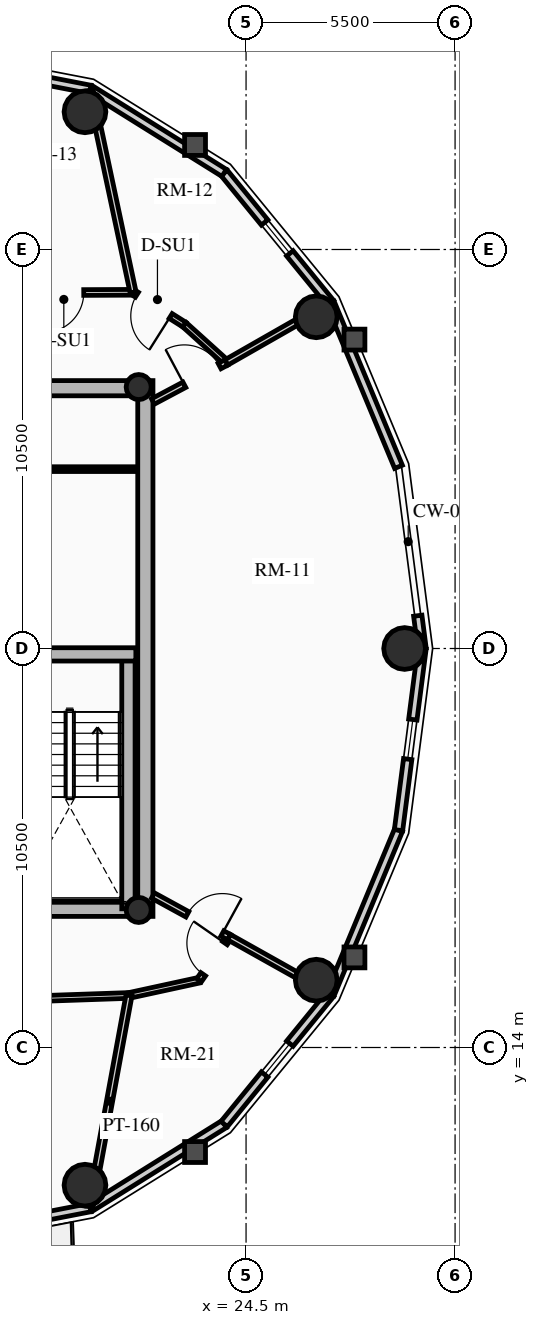
"""IFC4 building model, lengths in metres.
Left out: names, types, materials, properties, quantities, classifications, styles, units other than length and angle.
Written with IfcOpenShell. Run it as: python <this file> out.ifc"""

import sys

from ifc_helpers import new_model, si_unit, direction, frame, frame_2d, origin, origin_2d, place, context, subcontext, project, spatial, rectangle, circle, hollow_circle, extrude, source, transform, mapped, element, fill, save


model = new_model("IFC4")
c1 = context("Model", 3, precision=1e-05, world=origin(), true_north=direction((0.0, 1.0)))
c2 = subcontext(c1, "Body", "Model", "MODEL_VIEW")
j1 = project(units=[si_unit("LENGTHUNIT", "METRE"), si_unit("PLANEANGLEUNIT", "RADIAN")], contexts=[c1])
p1 = place(None, origin())
s1 = spatial("IfcSite", under=j1, at=p1, CompositionType="ELEMENT")
p2 = place(p1, origin())
s2 = spatial("IfcBuilding", under=s1, at=p2, CompositionType="ELEMENT")
p3 = place(p2, frame((0.0, 0.0, 205.39)))
s3 = spatial("IfcBuildingStorey", under=s2, at=p3, CompositionType="ELEMENT", Elevation=205.39)
p4 = place(p3, frame((21.85, 17.45, 0.0), z_axis=(0.0, 0.0, 1.0), x_axis=(0.0, 1.0, 0.0)))
e1 = element("IfcWall", 1, at=p4, inside=s3, PredefinedType="SHEAR", context=c2, shape_type="SweptSolid", body=[
    extrude(rectangle(XDim=14.1, YDim=0.4, at=frame_2d((7.05, 0.0))), origin(), (0.0, 0.0, 1.0), 2.91),
])
p5 = place(p3, frame((11.15, 17.65, 0.0), z_axis=(0.0, 0.0, 1.0), x_axis=(1.0, 0.0, 0.0)))
e2 = element("IfcWall", 2, at=p5, inside=s3, PredefinedType="SHEAR", context=c2, shape_type="SweptSolid", body=[
    extrude(rectangle(XDim=10.7, YDim=0.4, at=frame_2d((5.35, 0.0))), origin(), (0.0, 0.0, 1.0), 2.91),
])
m1 = source(origin(), c2, "Body", "SweptSolid", [
    extrude(rectangle(XDim=1.5, YDim=2.02, at=frame_2d((0.75, 1.01))), frame((0.0, 0.21, 0.0), z_axis=(0.0, -1.0, 0.0), x_axis=(1.0, 0.0, 0.0)), (0.0, 0.0, 1.0), 0.42),
])
p6 = place(p5, frame((5.45, 0.0, 0.0)))
e3 = element("IfcOpeningElement", 3, at=p6, cuts=e2, PredefinedType="OPENING", context=c2, shape_type="MappedRepresentation", body=[
    mapped(m1, transform((0.0, 0.0, 0.0), x_axis=(1.0, 0.0, 0.0), y_axis=(0.0, 1.0, 0.0), z_axis=(0.0, 0.0, 1.0), scale=1.0)),
])
p7 = place(p3, frame((11.15, 31.35, 0.0), z_axis=(0.0, 0.0, 1.0), x_axis=(1.0, 0.0, 0.0)))
e4 = element("IfcWall", 4, at=p7, inside=s3, PredefinedType="SHEAR", context=c2, shape_type="SweptSolid", body=[
    extrude(rectangle(XDim=10.7, YDim=0.4, at=frame_2d((5.35, 0.0))), origin(), (0.0, 0.0, 1.0), 2.91),
])
p8 = place(p7, frame((4.6, 0.0, 0.0)))
e5 = element("IfcOpeningElement", 5, at=p8, cuts=e4, PredefinedType="OPENING", context=c2, shape_type="MappedRepresentation", body=[
    mapped(m1, transform((0.0, 0.0, 0.0), x_axis=(1.0, 0.0, 0.0), y_axis=(0.0, 1.0, 0.0), z_axis=(0.0, 0.0, 1.0), scale=1.0)),
])
p9 = place(p3, frame((21.405, 17.65, 0.0), z_axis=(0.0, 0.0, 1.0), x_axis=(0.0, 1.0, 0.0)))
e6 = element("IfcWall", 6, at=p9, inside=s3, PredefinedType="SHEAR", context=c2, shape_type="SweptSolid", body=[
    extrude(rectangle(XDim=6.695, YDim=0.35, at=frame_2d((3.348, 0.0))), origin(), (0.0, 0.0, 1.0), 2.91),
])
p10 = place(p3, frame((18.315, 24.345, 0.0), z_axis=(0.0, 0.0, 1.0), x_axis=(1.0, 0.0, 0.0)))
e7 = element("IfcWall", 7, at=p10, inside=s3, PredefinedType="SHEAR", context=c2, shape_type="SweptSolid", body=[
    extrude(rectangle(XDim=3.285, YDim=0.35, at=frame_2d((1.643, 0.0))), origin(), (0.0, 0.0, 1.0), 2.91),
])
for number, where, z_axis, x_axis in (
    (8, (21.675, 17.62, 0.0), (0.0, 0.0, 1.0), (1.0, 0.0, 0.0)),
    (9, (21.675, 31.38, 0.0), (0.0, 0.0, 1.0), (1.0, 0.0, 0.0)),
):
    element("IfcColumn", number, at=place(p3, frame(where, z_axis=z_axis, x_axis=x_axis)), inside=s3, PredefinedType="COLUMN", context=c2, shape_type="SweptSolid", body=[
        extrude(hollow_circle(Radius=0.33, WallThickness=0.025, at=origin_2d()), origin(), (0.0, 0.0, 1.0), 2.91),
    ])
for number, where, z_axis, x_axis in (
    (10, (28.672, 24.5, 0.0), (0.0, 0.0, 1.0), (1.0, 0.0, 0.0)),
    (11, (26.347, 33.229, 0.0), (0.0, 0.0, 1.0), (1.0, 0.0, 0.0)),
    (12, (20.261, 38.623, 0.0), (0.0, 0.0, 1.0), (1.0, 0.0, 0.0)),
    (13, (20.261, 10.377, 0.0), (0.0, 0.0, 1.0), (1.0, 0.0, 0.0)),
    (14, (26.347, 15.771, 0.0), (0.0, 0.0, 1.0), (1.0, 0.0, 0.0)),
):
    element("IfcColumn", number, at=place(p3, frame(where, z_axis=z_axis, x_axis=x_axis)), inside=s3, PredefinedType="USERDEFINED", context=c2, shape_type="SweptSolid", body=[
        extrude(circle(Radius=0.55, at=origin_2d()), origin(), (0.0, 0.0, 1.0), 2.91),
    ])
p11 = place(p3, frame((29.018, 25.363, 0.0), z_axis=(0.0, 0.0, 1.0), x_axis=(0.128247365719, -0.991742211054, 0.0)))
e15 = element("IfcWall", 15, at=p11, inside=s3, PredefinedType="SOLIDWALL", context=c2, shape_type="SweptSolid", body=[
    extrude(rectangle(XDim=0.87, YDim=0.22, at=frame_2d((0.435, 0.0))), origin(), (0.0, 0.0, 1.0), 2.322),
])
p12 = place(p3, frame((26.718, 33.593, 0.0), z_axis=(0.0, 0.0, 1.0), x_axis=(0.384036305194, -0.923317993052, 0.0)))
e16 = element("IfcWall", 16, at=p12, inside=s3, PredefinedType="SOLIDWALL", context=c2, shape_type="SweptSolid", body=[
    extrude(rectangle(XDim=4.671, YDim=0.22, at=frame_2d((2.335, 0.0))), origin(), (0.0, 0.0, 1.0), 2.322),
])
p13 = place(p3, frame((23.924, 37.015, 0.0), z_axis=(0.0, 0.0, 1.0), x_axis=(0.632467166636, -0.774587169483, 0.0)))
e17 = element("IfcWall", 17, at=p13, inside=s3, PredefinedType="SOLIDWALL", context=c2, shape_type="SweptSolid", body=[
    extrude(rectangle(XDim=4.418, YDim=0.22, at=frame_2d((2.209, 0.0))), origin(), (0.0, 0.0, 1.0), 2.322),
])
m2 = source(origin(), c2, "Body", "SweptSolid", [
    extrude(rectangle(XDim=1.05, YDim=1.3, at=frame_2d((0.525, 0.65))), frame((0.0, 0.12, 0.0), z_axis=(0.0, -1.0, 0.0), x_axis=(1.0, 0.0, 0.0)), (0.0, 0.0, 1.0), 0.24),
])
p14 = place(p13, frame((1.684, 0.0, 0.65)))
e18 = element("IfcOpeningElement", 18, at=p14, cuts=e17, PredefinedType="OPENING", context=c2, shape_type="MappedRepresentation", body=[
    mapped(m2, transform((0.0, 0.0, 0.0), x_axis=(1.0, 0.0, 0.0), y_axis=(0.0, 1.0, 0.0), z_axis=(0.0, 0.0, 1.0), scale=1.0)),
])
p15 = place(p3, frame((20.403, 39.213, 0.0), z_axis=(0.0, 0.0, 1.0), x_axis=(0.848318713376, -0.529485939886, 0.0)))
e19 = element("IfcWall", 19, at=p15, inside=s3, PredefinedType="SOLIDWALL", context=c2, shape_type="SweptSolid", body=[
    extrude(rectangle(XDim=4.15, YDim=0.22, at=frame_2d((2.075, 0.0))), origin(), (0.0, 0.0, 1.0), 2.322),
])
p16 = place(p3, frame((16.5, 39.97, 0.0), z_axis=(0.0, 0.0, 1.0), x_axis=(0.981700307484, -0.190432419211, 0.0)))
e20 = element("IfcWall", 20, at=p16, inside=s3, PredefinedType="SOLIDWALL", context=c2, shape_type="SweptSolid", body=[
    extrude(rectangle(XDim=3.976, YDim=0.22, at=frame_2d((1.988, 0.0))), origin(), (0.0, 0.0, 1.0), 2.322),
])
p17 = place(p16, frame((1.463, 0.0, 0.65)))
e21 = element("IfcOpeningElement", 21, at=p17, cuts=e20, PredefinedType="OPENING", context=c2, shape_type="MappedRepresentation", body=[
    mapped(m2, transform((0.0, 0.0, 0.0), x_axis=(1.0, 0.0, 0.0), y_axis=(0.0, 1.0, 0.0), z_axis=(0.0, 0.0, 1.0), scale=1.0)),
])
p18 = place(p3, frame((20.403, 9.787, 0.0), z_axis=(0.0, 0.0, 1.0), x_axis=(-0.981700307484, -0.190432419211, 0.0)))
e22 = element("IfcWall", 22, at=p18, inside=s3, PredefinedType="SOLIDWALL", context=c2, shape_type="SweptSolid", body=[
    extrude(rectangle(XDim=3.976, YDim=0.22, at=frame_2d((1.988, 0.0))), origin(), (0.0, 0.0, 1.0), 2.322),
])
m3 = source(origin(), c2, "Body", "SweptSolid", [
    extrude(rectangle(XDim=1.15, YDim=2.005, at=frame_2d((0.575, 1.002))), frame((0.0, 0.12, 0.0), z_axis=(0.0, -1.0, 0.0), x_axis=(1.0, 0.0, 0.0)), (0.0, 0.0, 1.0), 0.24),
])
p19 = place(p18, frame((1.413, 0.0, 0.0)))
e23 = element("IfcOpeningElement", 23, at=p19, cuts=e22, PredefinedType="OPENING", context=c2, shape_type="MappedRepresentation", body=[
    mapped(m3, transform((0.0, 0.0, 0.0), x_axis=(1.0, 0.0, 0.0), y_axis=(0.0, 1.0, 0.0), z_axis=(0.0, 0.0, 1.0), scale=1.0)),
])
p20 = place(p3, frame((23.924, 11.985, 0.0), z_axis=(0.0, 0.0, 1.0), x_axis=(-0.848318713376, -0.529485939886, 0.0)))
e24 = element("IfcWall", 24, at=p20, inside=s3, PredefinedType="SOLIDWALL", context=c2, shape_type="SweptSolid", body=[
    extrude(rectangle(XDim=4.15, YDim=0.22, at=frame_2d((2.075, 0.0))), origin(), (0.0, 0.0, 1.0), 2.322),
])
p21 = place(p3, frame((26.718, 15.407, 0.0), z_axis=(0.0, 0.0, 1.0), x_axis=(-0.632467166636, -0.774587169483, 0.0)))
e25 = element("IfcWall", 25, at=p21, inside=s3, PredefinedType="SOLIDWALL", context=c2, shape_type="SweptSolid", body=[
    extrude(rectangle(XDim=4.418, YDim=0.22, at=frame_2d((2.209, 0.0))), origin(), (0.0, 0.0, 1.0), 2.322),
])
p22 = place(p21, frame((1.684, 0.0, 0.65)))
e26 = element("IfcOpeningElement", 26, at=p22, cuts=e25, PredefinedType="OPENING", context=c2, shape_type="MappedRepresentation", body=[
    mapped(m2, transform((0.0, 0.0, 0.0), x_axis=(1.0, 0.0, 0.0), y_axis=(0.0, 1.0, 0.0), z_axis=(0.0, 0.0, 1.0), scale=1.0)),
])
p23 = place(p3, frame((28.512, 19.719, 0.0), z_axis=(0.0, 0.0, 1.0), x_axis=(-0.384036305194, -0.923317993052, 0.0)))
e27 = element("IfcWall", 27, at=p23, inside=s3, PredefinedType="SOLIDWALL", context=c2, shape_type="SweptSolid", body=[
    extrude(rectangle(XDim=4.671, YDim=0.22, at=frame_2d((2.335, 0.0))), origin(), (0.0, 0.0, 1.0), 2.322),
])
p24 = place(p3, frame((29.13, 24.5, 0.0), z_axis=(0.0, 0.0, 1.0), x_axis=(-0.128241318541, -0.991742993027, 0.0)))
e28 = element("IfcWall", 28, at=p24, inside=s3, PredefinedType="SOLIDWALL", context=c2, shape_type="SweptSolid", body=[
    extrude(rectangle(XDim=4.82, YDim=0.22, at=frame_2d((2.41, 0.0))), origin(), (0.0, 0.0, 1.0), 2.322),
])
p25 = place(p24, frame((1.885, 0.0, 0.65)))
e29 = element("IfcOpeningElement", 29, at=p25, cuts=e28, PredefinedType="OPENING", context=c2, shape_type="MappedRepresentation", body=[
    mapped(m2, transform((0.0, 0.0, 0.0), x_axis=(1.0, 0.0, 0.0), y_axis=(0.0, 1.0, 0.0), z_axis=(0.0, 0.0, 1.0), scale=1.0)),
])
p26 = place(p3, frame((18.38, 29.22, 0.0), z_axis=(0.0, 0.0, 1.0), x_axis=(1.0, 0.0, 0.0)))
e30 = element("IfcWall", 30, at=p26, inside=s3, PredefinedType="PARTITIONING", context=c2, shape_type="SweptSolid", body=[
    extrude(rectangle(XDim=3.22, YDim=0.125, at=frame_2d((1.61, 0.0))), origin(), (0.0, 0.0, 1.0), 2.222),
])
p27 = place(p3, frame((23.98, 32.027, 0.0), z_axis=(0.0, 0.0, 1.0), x_axis=(-0.742353224332, 0.670008724065, 0.0)))
e31 = element("IfcWall", 31, at=p27, inside=s3, PredefinedType="PARTITIONING", context=c2, shape_type="SweptSolid", body=[
    extrude(rectangle(XDim=1.485, YDim=0.15, at=frame_2d((0.742, 0.0))), origin(), (0.0, 0.0, 1.0), 2.322),
])
p28 = place(p3, frame((22.877, 33.022, 0.0), z_axis=(0.0, 0.0, 1.0), x_axis=(-0.845895608855, 0.533348496689, 0.0)))
e32 = element("IfcWall", 32, at=p28, inside=s3, PredefinedType="PARTITIONING", context=c2, shape_type="SweptSolid", body=[
    extrude(rectangle(XDim=1.597, YDim=0.15, at=frame_2d((0.798, 0.0))), origin(), (0.0, 0.0, 1.0), 2.255),
])
m4 = source(origin(), c2, "Body", "SweptSolid", [
    extrude(rectangle(XDim=1.05, YDim=2.015, at=frame_2d((0.525, 1.007))), frame((0.0, 0.085, 0.0), z_axis=(0.0, -1.0, 0.0), x_axis=(1.0, 0.0, 0.0)), (0.0, 0.0, 1.0), 0.17),
])
p29 = place(p28, frame((0.427, 0.0, 0.0)))
e33 = element("IfcOpeningElement", 33, at=p29, cuts=e32, PredefinedType="OPENING", context=c2, shape_type="MappedRepresentation", body=[
    mapped(m4, transform((0.0, 0.0, 0.0), x_axis=(1.0, 0.0, 0.0), y_axis=(0.0, 1.0, 0.0), z_axis=(0.0, 0.0, 1.0), scale=1.0)),
])
p30 = place(p3, frame((21.527, 33.873, 0.0), z_axis=(0.0, 0.0, 1.0), x_axis=(-0.999991838845, -0.004040079574, 0.0)))
e34 = element("IfcWall", 34, at=p30, inside=s3, PredefinedType="PARTITIONING", context=c2, shape_type="SweptSolid", body=[
    extrude(rectangle(XDim=3.384, YDim=0.15, at=frame_2d((1.692, 0.0))), origin(), (0.0, 0.0, 1.0), 2.322),
])
p31 = place(p30, frame((1.298, 0.0, 0.0)))
e35 = element("IfcOpeningElement", 35, at=p31, cuts=e34, PredefinedType="OPENING", context=c2, shape_type="MappedRepresentation", body=[
    mapped(m4, transform((0.0, 0.0, 0.0), x_axis=(1.0, 0.0, 0.0), y_axis=(0.0, 1.0, 0.0), z_axis=(0.0, 0.0, 1.0), scale=1.0)),
])
p32 = place(p3, frame((14.781, 15.141, 0.0), z_axis=(0.0, 0.0, 1.0), x_axis=(0.999407918707, 0.034406569513, 0.0)))
e36 = element("IfcWall", 36, at=p32, inside=s3, PredefinedType="PARTITIONING", context=c2, shape_type="SweptSolid", body=[
    extrude(rectangle(XDim=6.642, YDim=0.15, at=frame_2d((3.321, 0.0))), origin(), (0.0, 0.0, 1.0), 2.255),
])
p33 = place(p32, frame((2.796, 0.0, 0.0)))
e37 = element("IfcOpeningElement", 37, at=p33, cuts=e36, PredefinedType="OPENING", context=c2, shape_type="MappedRepresentation", body=[
    mapped(m4, transform((0.0, 0.0, 0.0), x_axis=(1.0, 0.0, 0.0), y_axis=(0.0, 1.0, 0.0), z_axis=(0.0, 0.0, 1.0), scale=1.0)),
])
p34 = place(p3, frame((21.419, 15.369, 0.0), z_axis=(0.0, 0.0, 1.0), x_axis=(0.977192701953, 0.212354475464, 0.0)))
e38 = element("IfcWall", 38, at=p34, inside=s3, PredefinedType="PARTITIONING", context=c2, shape_type="SweptSolid", body=[
    extrude(rectangle(XDim=1.888, YDim=0.15, at=frame_2d((0.944, 0.0))), origin(), (0.0, 0.0, 1.0), 2.255),
])
p35 = place(p3, frame((23.263, 15.77, 0.0), z_axis=(0.0, 0.0, 1.0), x_axis=(0.570743456919, 0.821128434768, 0.0)))
e39 = element("IfcWall", 39, at=p35, inside=s3, PredefinedType="PARTITIONING", context=c2, shape_type="SweptSolid", body=[
    extrude(rectangle(XDim=1.382, YDim=0.15, at=frame_2d((0.691, 0.0))), origin(), (0.0, 0.0, 1.0), 2.322),
])
m5 = source(origin(), c2, "Body", "SweptSolid", [
    extrude(rectangle(XDim=1.0, YDim=2.015, at=frame_2d((0.5, 1.007))), frame((0.0, 0.085, 0.0), z_axis=(0.0, -1.0, 0.0), x_axis=(1.0, 0.0, 0.0)), (0.0, 0.0, 1.0), 0.17),
])
p36 = place(p35, frame((0.191, 0.0, 0.0)))
e40 = element("IfcOpeningElement", 40, at=p36, cuts=e39, PredefinedType="OPENING", context=c2, shape_type="MappedRepresentation", body=[
    mapped(m5, transform((0.0, 0.0, 0.0), x_axis=(1.0, 0.0, 0.0), y_axis=(0.0, 1.0, 0.0), z_axis=(0.0, 0.0, 1.0), scale=1.0)),
])
p37 = place(p3, frame((23.98, 32.027, 0.0), z_axis=(0.0, 0.0, 1.0), x_axis=(0.868372526378, 0.495912447345, 0.0)))
e41 = element("IfcWall", 41, at=p37, inside=s3, PredefinedType="PARTITIONING", context=c2, shape_type="SweptSolid", body=[
    extrude(rectangle(XDim=3.135, YDim=0.16, at=frame_2d((1.567, 0.0))), origin(), (0.0, 0.0, 1.0), 2.322),
])
p38 = place(p3, frame((21.527, 33.873, 0.0), z_axis=(0.0, 0.0, 1.0), x_axis=(-0.207772326864, 0.97817721308, 0.0)))
e42 = element("IfcWall", 42, at=p38, inside=s3, PredefinedType="PARTITIONING", context=c2, shape_type="SweptSolid", body=[
    extrude(rectangle(XDim=5.439, YDim=0.16, at=frame_2d((2.72, 0.0))), origin(), (0.0, 0.0, 1.0), 2.322),
])
p39 = place(p3, frame((21.419, 15.369, 0.0), z_axis=(0.0, 0.0, 1.0), x_axis=(-0.180685606423, -0.98354090491, 0.0)))
e43 = element("IfcWall", 43, at=p39, inside=s3, PredefinedType="PARTITIONING", context=c2, shape_type="SweptSolid", body=[
    extrude(rectangle(XDim=5.656, YDim=0.16, at=frame_2d((2.828, 0.0))), origin(), (0.0, 0.0, 1.0), 2.322),
])
p40 = place(p3, frame((24.052, 16.905, 0.0), z_axis=(0.0, 0.0, 1.0), x_axis=(0.872220814965, -0.489112308106, 0.0)))
e44 = element("IfcWall", 44, at=p40, inside=s3, PredefinedType="PARTITIONING", context=c2, shape_type="SweptSolid", body=[
    extrude(rectangle(XDim=3.038, YDim=0.16, at=frame_2d((1.519, 0.0))), origin(), (0.0, 0.0, 1.0), 2.322),
])
p41 = place(p3, frame((22.05, 31.0, 0.0), z_axis=(0.0, 0.0, 1.0), x_axis=(0.882791584709, 0.469764853908, 0.0)))
e45 = element("IfcWall", 45, at=p41, inside=s3, PredefinedType="PARTITIONING", context=c2, shape_type="SweptSolid", body=[
    extrude(rectangle(XDim=2.186, YDim=0.16, at=frame_2d((1.093, 0.0))), origin(), (0.0, 0.0, 1.0), 2.255),
])
m6 = source(origin(), c2, "Body", "SweptSolid", [
    extrude(rectangle(XDim=1.05, YDim=2.015, at=frame_2d((0.525, 1.007))), frame((0.0, 0.09, 0.0), z_axis=(0.0, -1.0, 0.0), x_axis=(1.0, 0.0, 0.0)), (0.0, 0.0, 1.0), 0.18),
])
p42 = place(p41, frame((0.936, 0.0, 0.0)))
e46 = element("IfcOpeningElement", 46, at=p42, cuts=e45, PredefinedType="OPENING", context=c2, shape_type="MappedRepresentation", body=[
    mapped(m6, transform((0.0, 0.0, 0.0), x_axis=(1.0, 0.0, 0.0), y_axis=(0.0, 1.0, 0.0), z_axis=(0.0, 0.0, 1.0), scale=1.0)),
])
p43 = place(p3, frame((22.05, 18.0, 0.0), z_axis=(0.0, 0.0, 1.0), x_axis=(0.877252891813, -0.480028503118, 0.0)))
e47 = element("IfcWall", 47, at=p43, inside=s3, PredefinedType="PARTITIONING", context=c2, shape_type="SweptSolid", body=[
    extrude(rectangle(XDim=2.282, YDim=0.16, at=frame_2d((1.141, 0.0))), origin(), (0.0, 0.0, 1.0), 2.255),
])
p44 = place(p43, frame((1.032, 0.0, 0.0)))
e48 = element("IfcOpeningElement", 48, at=p44, cuts=e47, PredefinedType="OPENING", context=c2, shape_type="MappedRepresentation", body=[
    mapped(m6, transform((0.0, 0.0, 0.0), x_axis=(1.0, 0.0, 0.0), y_axis=(0.0, 1.0, 0.0), z_axis=(0.0, 0.0, 1.0), scale=1.0)),
])
m7 = source(origin(), c2, "Body", "SweptSolid", [
    extrude(rectangle(XDim=1.05, YDim=1.3, at=frame_2d((0.525, 0.65))), frame((0.0, 0.03, 0.0), z_axis=(0.0, -1.0, 0.0), x_axis=(1.0, 0.0, 0.0)), (0.0, 0.0, 1.0), 0.06),
])
p45 = place(p14, origin())
e49 = element("IfcWindow", 49, at=p45, inside=s3, PartitioningType="SINGLE_PANEL", PredefinedType="WINDOW", context=c2, shape_type="MappedRepresentation", body=[
    mapped(m7, transform((0.0, 0.0, 0.0), x_axis=(1.0, 0.0, 0.0), y_axis=(0.0, 1.0, 0.0), z_axis=(0.0, 0.0, 1.0), scale=1.0)),
])
fill(e18, e49)
p46 = place(p22, origin())
e50 = element("IfcWindow", 50, at=p46, inside=s3, PartitioningType="SINGLE_PANEL", PredefinedType="WINDOW", context=c2, shape_type="MappedRepresentation", body=[
    mapped(m7, transform((0.0, 0.0, 0.0), x_axis=(1.0, 0.0, 0.0), y_axis=(0.0, 1.0, 0.0), z_axis=(0.0, 0.0, 1.0), scale=1.0)),
])
fill(e26, e50)
p47 = place(p25, origin())
e51 = element("IfcWindow", 51, at=p47, inside=s3, PartitioningType="SINGLE_PANEL", PredefinedType="WINDOW", context=c2, shape_type="MappedRepresentation", body=[
    mapped(m7, transform((0.0, 0.0, 0.0), x_axis=(1.0, 0.0, 0.0), y_axis=(0.0, 1.0, 0.0), z_axis=(0.0, 0.0, 1.0), scale=1.0)),
])
fill(e29, e51)
m8 = source(origin(), c2, "Body", "SweptSolid", [
    extrude(rectangle(XDim=1.05, YDim=2.015, at=frame_2d((0.525, 1.007))), frame((0.0, 0.025, 0.0), z_axis=(0.0, -1.0, 0.0), x_axis=(1.0, 0.0, 0.0)), (0.0, 0.0, 1.0), 0.05),
])
p48 = place(p42, origin())
e52 = element("IfcDoor", 52, at=p48, inside=s3, OperationType="SINGLE_SWING_LEFT", PredefinedType="DOOR", context=c2, shape_type="MappedRepresentation", body=[
    mapped(m8, transform((0.0, 0.0, 0.0), x_axis=(1.0, 0.0, 0.0), y_axis=(0.0, 1.0, 0.0), z_axis=(0.0, 0.0, 1.0), scale=1.0)),
])
fill(e46, e52)
p49 = place(p44, origin())
e53 = element("IfcDoor", 53, at=p49, inside=s3, OperationType="SINGLE_SWING_RIGHT", PredefinedType="DOOR", context=c2, shape_type="MappedRepresentation", body=[
    mapped(m8, transform((0.0, 0.0, 0.0), x_axis=(1.0, 0.0, 0.0), y_axis=(0.0, 1.0, 0.0), z_axis=(0.0, 0.0, 1.0), scale=1.0)),
])
fill(e48, e53)
p50 = place(p29, origin())
e54 = element("IfcDoor", 54, at=p50, inside=s3, OperationType="SINGLE_SWING_LEFT", PredefinedType="DOOR", context=c2, shape_type="MappedRepresentation", body=[
    mapped(m8, transform((0.0, 0.0, 0.0), x_axis=(1.0, 0.0, 0.0), y_axis=(0.0, 1.0, 0.0), z_axis=(0.0, 0.0, 1.0), scale=1.0)),
])
fill(e33, e54)
p51 = place(p31, origin())
e55 = element("IfcDoor", 55, at=p51, inside=s3, OperationType="SINGLE_SWING_RIGHT", PredefinedType="DOOR", context=c2, shape_type="MappedRepresentation", body=[
    mapped(m8, transform((0.0, 0.0, 0.0), x_axis=(1.0, 0.0, 0.0), y_axis=(0.0, 1.0, 0.0), z_axis=(0.0, 0.0, 1.0), scale=1.0)),
])
fill(e35, e55)
m9 = source(origin(), c2, "Body", "SweptSolid", [
    extrude(rectangle(XDim=1.0, YDim=2.015, at=frame_2d((0.5, 1.007))), frame((0.0, 0.025, 0.0), z_axis=(0.0, -1.0, 0.0), x_axis=(1.0, 0.0, 0.0)), (0.0, 0.0, 1.0), 0.05),
])
p52 = place(p36, origin())
e56 = element("IfcDoor", 56, at=p52, inside=s3, OperationType="SINGLE_SWING_RIGHT", PredefinedType="DOOR", context=c2, shape_type="MappedRepresentation", body=[
    mapped(m9, transform((0.0, 0.0, 0.0), x_axis=(1.0, 0.0, 0.0), y_axis=(0.0, 1.0, 0.0), z_axis=(0.0, 0.0, 1.0), scale=1.0)),
])
fill(e40, e56)
save(model, sys.argv[1])
